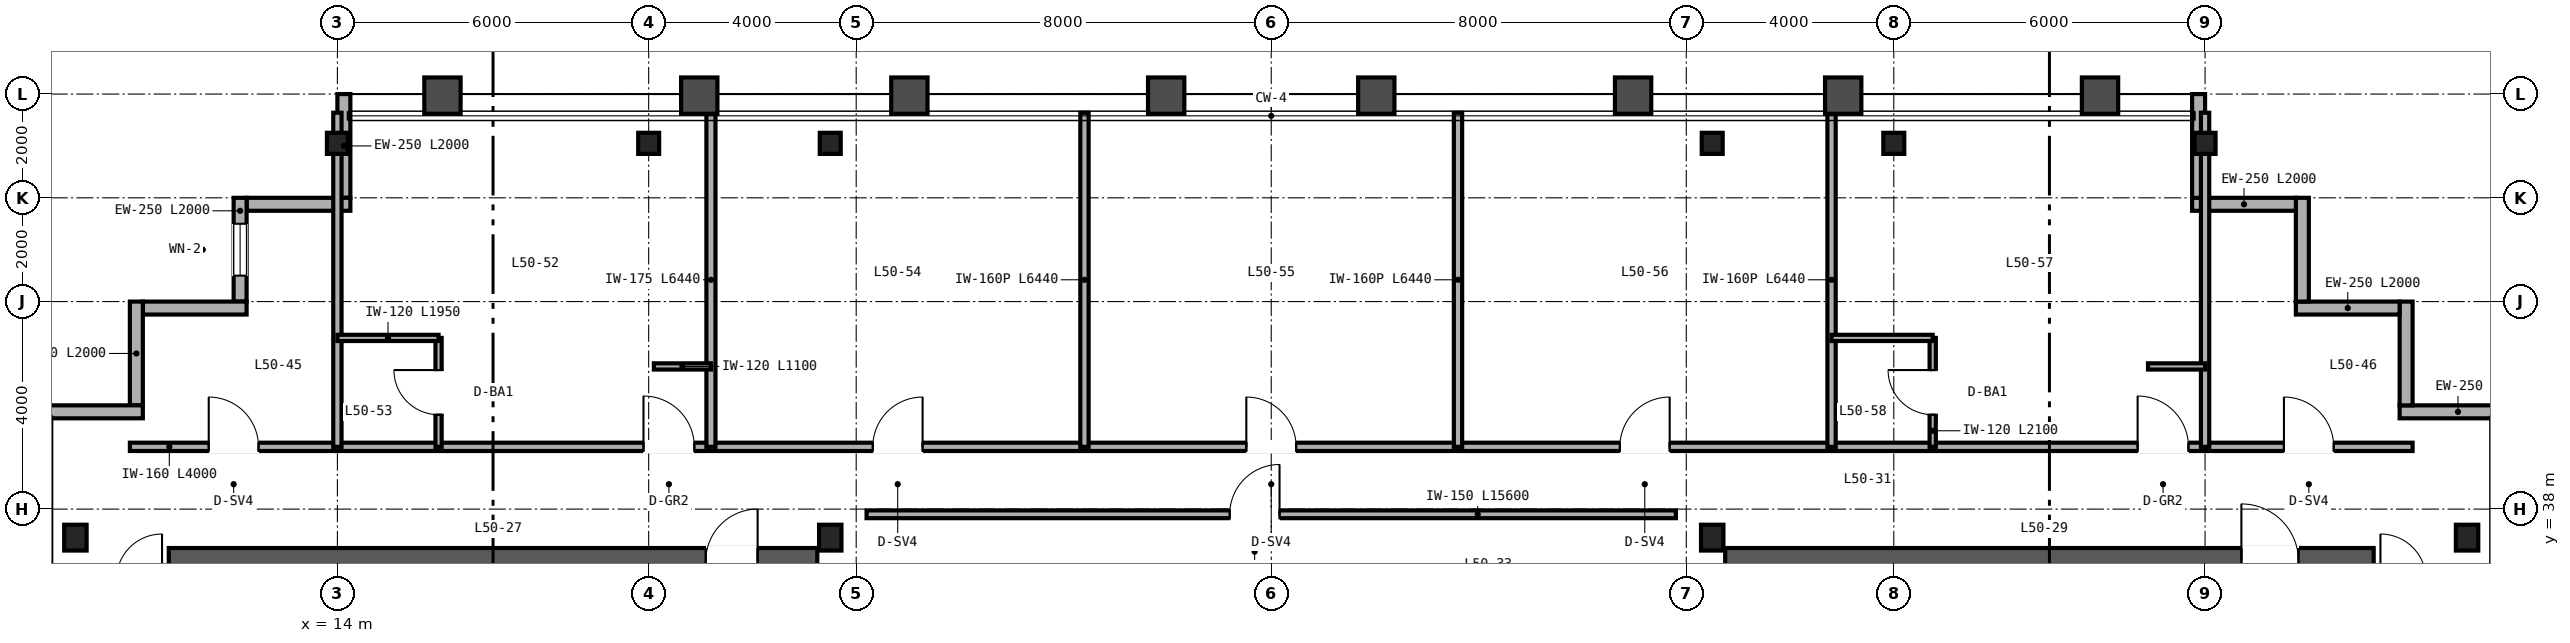
"""IFC4 building model, lengths in metres.
Left out: names, types, materials, properties, quantities, classifications, styles, units other than length and angle.
Written with IfcOpenShell. Run it as: python <this file> out.ifc"""

import sys

from ifc_helpers import new_model, si_unit, direction, frame, frame_2d, origin, origin_2d, place, context, subcontext, project, spatial, rectangle, i_section, extrude, source, transform, mapped, element, fill, save


model = new_model("IFC4")
c1 = context("Model", 3, precision=1e-05, world=origin(), true_north=direction((0.0, 1.0)))
c2 = subcontext(c1, "Body", "Model", "MODEL_VIEW")
j1 = project(units=[si_unit("LENGTHUNIT", "METRE"), si_unit("PLANEANGLEUNIT", "RADIAN")], contexts=[c1])
p1 = place(None, origin())
s1 = spatial("IfcSite", under=j1, at=p1, CompositionType="ELEMENT")
p2 = place(p1, origin())
s2 = spatial("IfcBuilding", under=s1, at=p2, CompositionType="ELEMENT")
p3 = place(p2, frame((0.0, 0.0, 199.2)))
s3 = spatial("IfcBuildingStorey", under=s2, at=p3, CompositionType="ELEMENT", Elevation=199.2)
p4 = place(p3, frame((10.75, 37.0, 0.0), z_axis=(0.0, 0.0, 1.0), x_axis=(1.0, 0.0, 0.0)))
e1 = element("IfcWall", 1, at=p4, inside=s3, PredefinedType="SHEAR", context=c2, shape_type="SweptSolid", body=[
    extrude(rectangle(XDim=12.5, YDim=0.5, at=frame_2d((6.25, 0.0))), origin(), (0.0, 0.0, 1.0), 3.37),
])
p5 = place(p4, frame((10.35, 0.0, 0.0)))
e2 = element("IfcOpeningElement", 2, at=p5, cuts=e1, PredefinedType="OPENING", context=c2, shape_type="SweptSolid", body=[
    extrude(rectangle(XDim=1.0, YDim=2.15, at=frame_2d((0.5, 1.075))), frame((0.0, 0.26, 0.0), z_axis=(0.0, -1.0, 0.0), x_axis=(1.0, 0.0, 0.0)), (0.0, 0.0, 1.0), 0.52),
])
p6 = place(p3, frame((40.75, 37.0, 0.0), z_axis=(0.0, 0.0, 1.0), x_axis=(1.0, 0.0, 0.0)))
e3 = element("IfcWall", 3, at=p6, inside=s3, PredefinedType="SHEAR", context=c2, shape_type="SweptSolid", body=[
    extrude(rectangle(XDim=12.5, YDim=0.5, at=frame_2d((6.25, 0.0))), origin(), (0.0, 0.0, 1.0), 3.37),
])
p7 = place(p6, frame((9.95, 0.0, 0.0)))
e4 = element("IfcOpeningElement", 4, at=p7, cuts=e3, PredefinedType="OPENING", context=c2, shape_type="SweptSolid", body=[
    extrude(rectangle(XDim=1.1, YDim=2.15, at=frame_2d((0.55, 1.075))), frame((0.0, 0.26, 0.0), z_axis=(0.0, -1.0, 0.0), x_axis=(1.0, 0.0, 0.0)), (0.0, 0.0, 1.0), 0.52),
])
m1 = source(origin(), c2, "Body", "SweptSolid", [
    extrude(i_section(OverallWidth=0.432, OverallDepth=0.498, WebThickness=0.056, FlangeThickness=0.089, FilletRadius=0.025, at=origin_2d()), origin(), (0.0, 0.0, 1.0), 3.37),
])
for number, where, z_axis, x_axis in (
    (5, (8.95, 37.45, 0.0), (0.0, 0.0, 1.0), (1.0, 0.0, 0.0)),
    (6, (23.5, 37.45, 0.0), (0.0, 0.0, 1.0), (1.0, 0.0, 0.0)),
    (7, (40.5, 37.45, 0.0), (0.0, 0.0, 1.0), (1.0, 0.0, 0.0)),
    (8, (55.05, 37.45, 0.0), (0.0, 0.0, 1.0), (1.0, 0.0, 0.0)),
):
    element("IfcColumn", number, at=place(p3, frame(where, z_axis=z_axis, x_axis=x_axis)), inside=s3, PredefinedType="COLUMN", context=c2, shape_type="MappedRepresentation", body=[
        mapped(m1, transform((0.0, 0.0, 0.0), scale=1.0)),
    ])
m2 = source(origin(), c2, "Body", "SweptSolid", [
    extrude(i_section(OverallWidth=0.404, OverallDepth=0.407, WebThickness=0.027, FlangeThickness=0.044, FilletRadius=0.025, at=origin_2d()), origin(), (0.0, 0.0, 1.0), 3.37),
])
for number, where, z_axis, x_axis in (
    (9, (14.0, 45.05, 0.0), (0.0, 0.0, 1.0), (1.0, 0.0, 0.0)),
    (10, (20.0, 45.05, 0.0), (0.0, 0.0, 1.0), (1.0, 0.0, 0.0)),
    (11, (23.5, 45.05, 0.0), (0.0, 0.0, 1.0), (1.0, 0.0, 0.0)),
    (12, (40.5, 45.05, 0.0), (0.0, 0.0, 1.0), (1.0, 0.0, 0.0)),
    (13, (44.0, 45.05, 0.0), (0.0, 0.0, 1.0), (1.0, 0.0, 0.0)),
    (14, (50.0, 45.05, 0.0), (0.0, 0.0, 1.0), (1.0, 0.0, 0.0)),
):
    element("IfcColumn", number, at=place(p3, frame(where, z_axis=z_axis, x_axis=x_axis)), inside=s3, PredefinedType="COLUMN", context=c2, shape_type="MappedRepresentation", body=[
        mapped(m2, transform((0.0, 0.0, 0.0), scale=1.0)),
    ])
p8 = place(p3, frame((56.0, 39.875, 0.0), z_axis=(0.0, 0.0, 1.0), x_axis=(-1.0, 0.0, 0.0)))
e15 = element("IfcWall", 15, at=p8, inside=s3, PredefinedType="SOLIDWALL", context=c2, shape_type="SweptSolid", body=[
    extrude(rectangle(XDim=2.25, YDim=0.25, at=frame_2d((1.125, 0.0))), origin(), (0.0, 0.0, 1.0), 3.37),
])
for number, where, z_axis, x_axis in (
    (16, (53.875, 40.0, 0.0), (0.0, 0.0, 1.0), (0.0, 1.0, 0.0)),
    (17, (53.75, 41.875, 0.0), (0.0, 0.0, 1.0), (-1.0, 0.0, 0.0)),
    (18, (51.875, 42.0, 0.0), (0.0, 0.0, 1.0), (0.0, 1.0, 0.0)),
    (19, (51.75, 43.875, 0.0), (0.0, 0.0, 1.0), (-1.0, 0.0, 0.0)),
):
    element("IfcWall", number, at=place(p3, frame(where, z_axis=z_axis, x_axis=x_axis)), inside=s3, PredefinedType="SOLIDWALL", context=c2, shape_type="SweptSolid", body=[
        extrude(rectangle(XDim=2.0, YDim=0.25, at=frame_2d((1.0, 0.0))), origin(), (0.0, 0.0, 1.0), 3.37),
    ])
for number, where, z_axis, x_axis in (
    (20, (49.875, 44.0, 0.0), (0.0, 0.0, 1.0), (0.0, 1.0, 0.0)),
    (21, (14.125, 46.0, 0.0), (0.0, 0.0, 1.0), (0.0, -1.0, 0.0)),
):
    element("IfcWall", number, at=place(p3, frame(where, z_axis=z_axis, x_axis=x_axis)), inside=s3, PredefinedType="SOLIDWALL", context=c2, shape_type="SweptSolid", body=[
        extrude(rectangle(XDim=2.0, YDim=0.25, at=frame_2d((1.0, 0.0))), origin(), (0.0, 0.0, 1.0), 2.677),
    ])
p9 = place(p3, frame((14.25, 43.875, 0.0), z_axis=(0.0, 0.0, 1.0), x_axis=(-1.0, 0.0, 0.0)))
e22 = element("IfcWall", 22, at=p9, inside=s3, PredefinedType="SOLIDWALL", context=c2, shape_type="SweptSolid", body=[
    extrude(rectangle(XDim=2.0, YDim=0.25, at=frame_2d((1.0, 0.0))), origin(), (0.0, 0.0, 1.0), 3.37),
])
p10 = place(p3, frame((12.125, 44.0, 0.0), z_axis=(0.0, 0.0, 1.0), x_axis=(0.0, -1.0, 0.0)))
e23 = element("IfcWall", 23, at=p10, inside=s3, PredefinedType="SOLIDWALL", context=c2, shape_type="SweptSolid", body=[
    extrude(rectangle(XDim=2.0, YDim=0.25, at=frame_2d((1.0, 0.0))), origin(), (0.0, 0.0, 1.0), 3.37),
])
p11 = place(p10, frame((0.5, 0.0, 0.85)))
e24 = element("IfcOpeningElement", 24, at=p11, cuts=e23, PredefinedType="OPENING", context=c2, shape_type="SweptSolid", body=[
    extrude(rectangle(XDim=1.0, YDim=1.9, at=frame_2d((0.5, 0.95))), frame((0.0, 0.135, 0.0), z_axis=(0.0, -1.0, 0.0), x_axis=(1.0, 0.0, 0.0)), (0.0, 0.0, 1.0), 0.27),
])
for number, where, z_axis, x_axis in (
    (25, (12.25, 41.875, 0.0), (0.0, 0.0, 1.0), (-1.0, 0.0, 0.0)),
    (26, (10.125, 42.0, 0.0), (0.0, 0.0, 1.0), (0.0, -1.0, 0.0)),
):
    element("IfcWall", number, at=place(p3, frame(where, z_axis=z_axis, x_axis=x_axis)), inside=s3, PredefinedType="SOLIDWALL", context=c2, shape_type="SweptSolid", body=[
        extrude(rectangle(XDim=2.0, YDim=0.25, at=frame_2d((1.0, 0.0))), origin(), (0.0, 0.0, 1.0), 3.37),
    ])
p12 = place(p3, frame((10.25, 39.875, 0.0), z_axis=(0.0, 0.0, 1.0), x_axis=(-1.0, 0.0, 0.0)))
e27 = element("IfcWall", 27, at=p12, inside=s3, PredefinedType="SOLIDWALL", context=c2, shape_type="SweptSolid", body=[
    extrude(rectangle(XDim=2.25, YDim=0.25, at=frame_2d((1.125, 0.0))), origin(), (0.0, 0.0, 1.0), 3.37),
])
p13 = place(p3, frame((24.2, 37.9, 0.0), z_axis=(0.0, 0.0, 1.0), x_axis=(1.0, 0.0, 0.0)))
e28 = element("IfcWall", 28, at=p13, inside=s3, PredefinedType="PARTITIONING", context=c2, shape_type="SweptSolid", body=[
    extrude(rectangle(XDim=15.6, YDim=0.15, at=frame_2d((7.8, 0.0))), origin(), (0.0, 0.0, 1.0), 3.37),
])
p14 = place(p13, frame((7.0, 0.0, 0.0)))
e29 = element("IfcOpeningElement", 29, at=p14, cuts=e28, PredefinedType="OPENING", context=c2, shape_type="SweptSolid", body=[
    extrude(rectangle(XDim=0.96, YDim=2.15, at=frame_2d((0.48, 1.075))), frame((0.0, 0.085, 0.0), z_axis=(0.0, -1.0, 0.0), x_axis=(1.0, 0.0, 0.0)), (0.0, 0.0, 1.0), 0.17),
])
p15 = place(p3, frame((10.0, 39.2, 0.0), z_axis=(0.0, 0.0, 1.0), x_axis=(1.0, 0.0, 0.0)))
e30 = element("IfcWall", 30, at=p15, inside=s3, PredefinedType="PARTITIONING", context=c2, shape_type="SweptSolid", body=[
    extrude(rectangle(XDim=4.0, YDim=0.16, at=frame_2d((2.0, 0.0))), origin(), (0.0, 0.0, 1.0), 3.37),
])
p16 = place(p15, frame((1.52, 0.0, 0.0)))
e31 = element("IfcOpeningElement", 31, at=p16, cuts=e30, PredefinedType="OPENING", context=c2, shape_type="SweptSolid", body=[
    extrude(rectangle(XDim=0.96, YDim=2.15, at=frame_2d((0.48, 1.075))), frame((0.0, 0.09, 0.0), z_axis=(0.0, -1.0, 0.0), x_axis=(1.0, 0.0, 0.0)), (0.0, 0.0, 1.0), 0.18),
])
p17 = place(p3, frame((50.0, 39.2, 0.0), z_axis=(0.0, 0.0, 1.0), x_axis=(1.0, 0.0, 0.0)))
e32 = element("IfcWall", 32, at=p17, inside=s3, PredefinedType="PARTITIONING", context=c2, shape_type="SweptSolid", body=[
    extrude(rectangle(XDim=4.0, YDim=0.16, at=frame_2d((2.0, 0.0))), origin(), (0.0, 0.0, 1.0), 3.37),
])
p18 = place(p17, frame((1.52, 0.0, 0.0)))
e33 = element("IfcOpeningElement", 33, at=p18, cuts=e32, PredefinedType="OPENING", context=c2, shape_type="SweptSolid", body=[
    extrude(rectangle(XDim=0.96, YDim=2.15, at=frame_2d((0.48, 1.075))), frame((0.0, 0.09, 0.0), z_axis=(0.0, -1.0, 0.0), x_axis=(1.0, 0.0, 0.0)), (0.0, 0.0, 1.0), 0.18),
])
p19 = place(p3, frame((14.0, 39.2, 0.0), z_axis=(0.0, 0.0, 1.0), x_axis=(1.0, 0.0, 0.0)))
e34 = element("IfcWall", 34, at=p19, inside=s3, PredefinedType="PARTITIONING", context=c2, shape_type="SweptSolid", body=[
    extrude(rectangle(XDim=36.0, YDim=0.16, at=frame_2d((18.0, 0.0))), origin(), (0.0, 0.0, 1.0), 2.913),
])
p20 = place(p19, frame((5.9, 0.0, 0.0)))
e35 = element("IfcOpeningElement", 35, at=p20, cuts=e34, PredefinedType="OPENING", context=c2, shape_type="SweptSolid", body=[
    extrude(rectangle(XDim=0.98, YDim=2.2, at=frame_2d((0.49, 1.1))), frame((0.0, 0.09, 0.0), z_axis=(0.0, -1.0, 0.0), x_axis=(1.0, 0.0, 0.0)), (0.0, 0.0, 1.0), 0.18),
])
p21 = place(p19, frame((10.32, 0.0, 0.0)))
e36 = element("IfcOpeningElement", 36, at=p21, cuts=e34, PredefinedType="OPENING", context=c2, shape_type="SweptSolid", body=[
    extrude(rectangle(XDim=0.96, YDim=2.15, at=frame_2d((0.48, 1.075))), frame((0.0, 0.09, 0.0), z_axis=(0.0, -1.0, 0.0), x_axis=(1.0, 0.0, 0.0)), (0.0, 0.0, 1.0), 0.18),
])
p22 = place(p19, frame((17.52, 0.0, 0.0)))
e37 = element("IfcOpeningElement", 37, at=p22, cuts=e34, PredefinedType="OPENING", context=c2, shape_type="SweptSolid", body=[
    extrude(rectangle(XDim=0.96, YDim=2.15, at=frame_2d((0.48, 1.075))), frame((0.0, 0.09, 0.0), z_axis=(0.0, -1.0, 0.0), x_axis=(1.0, 0.0, 0.0)), (0.0, 0.0, 1.0), 0.18),
])
p23 = place(p19, frame((24.72, 0.0, 0.0)))
e38 = element("IfcOpeningElement", 38, at=p23, cuts=e34, PredefinedType="OPENING", context=c2, shape_type="SweptSolid", body=[
    extrude(rectangle(XDim=0.96, YDim=2.15, at=frame_2d((0.48, 1.075))), frame((0.0, 0.09, 0.0), z_axis=(0.0, -1.0, 0.0), x_axis=(1.0, 0.0, 0.0)), (0.0, 0.0, 1.0), 0.18),
])
p24 = place(p19, frame((34.7, 0.0, 0.0)))
e39 = element("IfcOpeningElement", 39, at=p24, cuts=e34, PredefinedType="OPENING", context=c2, shape_type="SweptSolid", body=[
    extrude(rectangle(XDim=0.98, YDim=2.2, at=frame_2d((0.49, 1.1))), frame((0.0, 0.09, 0.0), z_axis=(0.0, -1.0, 0.0), x_axis=(1.0, 0.0, 0.0)), (0.0, 0.0, 1.0), 0.18),
])
for number, where, z_axis, x_axis in (
    (40, (14.0, 39.2, 0.0), (0.0, 0.0, 1.0), (0.0, 1.0, 0.0)),
    (41, (50.0, 39.2, 0.0), (0.0, 0.0, 1.0), (0.0, 1.0, 0.0)),
):
    element("IfcWall", number, at=place(p3, frame(where, z_axis=z_axis, x_axis=x_axis)), inside=s3, PredefinedType="PARTITIONING", context=c2, shape_type="SweptSolid", body=[
        extrude(rectangle(XDim=6.44, YDim=0.16, at=frame_2d((3.22, 0.0))), origin(), (0.0, 0.0, 1.0), 2.677),
    ])
p25 = place(p3, frame((21.2, 39.2, 0.0), z_axis=(0.0, 0.0, 1.0), x_axis=(0.0, 1.0, 0.0)))
e42 = element("IfcWall", 42, at=p25, inside=s3, PredefinedType="PARTITIONING", context=c2, shape_type="SweptSolid", body=[
    extrude(rectangle(XDim=6.44, YDim=0.175, at=frame_2d((3.22, 0.0))), origin(), (0.0, 0.0, 1.0), 2.833),
])
p26 = place(p3, frame((15.95, 39.2, 0.0), z_axis=(0.0, 0.0, 1.0), x_axis=(0.0, 1.0, 0.0)))
e43 = element("IfcWall", 43, at=p26, inside=s3, PredefinedType="PARTITIONING", context=c2, shape_type="SweptSolid", body=[
    extrude(rectangle(XDim=2.1, YDim=0.12, at=frame_2d((1.05, 0.0))), origin(), (0.0, 0.0, 1.0), 3.37),
])
p27 = place(p26, frame((0.62, 0.0, 0.0)))
e44 = element("IfcOpeningElement", 44, at=p27, cuts=e43, PredefinedType="OPENING", context=c2, shape_type="SweptSolid", body=[
    extrude(rectangle(XDim=0.86, YDim=2.1, at=frame_2d((0.43, 1.05))), frame((0.0, 0.07, 0.0), z_axis=(0.0, -1.0, 0.0), x_axis=(1.0, 0.0, 0.0)), (0.0, 0.0, 1.0), 0.14),
])
p28 = place(p3, frame((14.0, 41.3, 0.0), z_axis=(0.0, 0.0, 1.0), x_axis=(1.0, 0.0, 0.0)))
e45 = element("IfcWall", 45, at=p28, inside=s3, PredefinedType="PARTITIONING", context=c2, shape_type="SweptSolid", body=[
    extrude(rectangle(XDim=1.95, YDim=0.12, at=frame_2d((0.975, 0.0))), origin(), (0.0, 0.0, 1.0), 3.37),
])
p29 = place(p3, frame((20.1, 40.75, 0.0), z_axis=(0.0, 0.0, 1.0), x_axis=(1.0, 0.0, 0.0)))
e46 = element("IfcWall", 46, at=p29, inside=s3, PredefinedType="PARTITIONING", context=c2, shape_type="SweptSolid", body=[
    extrude(rectangle(XDim=1.1, YDim=0.12, at=frame_2d((0.55, 0.0))), origin(), (0.0, 0.0, 1.0), 3.37),
])
for number, where, z_axis, x_axis in (
    (47, (28.4, 39.2, 0.0), (0.0, 0.0, 1.0), (0.0, 1.0, 0.0)),
    (48, (35.6, 39.2, 0.0), (0.0, 0.0, 1.0), (0.0, 1.0, 0.0)),
):
    element("IfcWall", number, at=place(p3, frame(where, z_axis=z_axis, x_axis=x_axis)), inside=s3, PredefinedType="PARTITIONING", context=c2, shape_type="SweptSolid", body=[
        extrude(rectangle(XDim=6.44, YDim=0.16, at=frame_2d((3.22, 0.0))), origin(), (0.0, 0.0, 1.0), 2.443),
    ])
p30 = place(p3, frame((42.8, 39.2, 0.0), z_axis=(0.0, 0.0, 1.0), x_axis=(0.0, 1.0, 0.0)))
e49 = element("IfcWall", 49, at=p30, inside=s3, PredefinedType="PARTITIONING", context=c2, shape_type="SweptSolid", body=[
    extrude(rectangle(XDim=6.44, YDim=0.16, at=frame_2d((3.22, 0.0))), origin(), (0.0, 0.0, 1.0), 2.833),
])
p31 = place(p3, frame((44.75, 39.2, 0.0), z_axis=(0.0, 0.0, 1.0), x_axis=(0.0, 1.0, 0.0)))
e50 = element("IfcWall", 50, at=p31, inside=s3, PredefinedType="PARTITIONING", context=c2, shape_type="SweptSolid", body=[
    extrude(rectangle(XDim=2.1, YDim=0.12, at=frame_2d((1.05, 0.0))), origin(), (0.0, 0.0, 1.0), 3.37),
])
p32 = place(p31, frame((0.62, 0.0, 0.0)))
e51 = element("IfcOpeningElement", 51, at=p32, cuts=e50, PredefinedType="OPENING", context=c2, shape_type="SweptSolid", body=[
    extrude(rectangle(XDim=0.86, YDim=2.1, at=frame_2d((0.43, 1.05))), frame((0.0, 0.07, 0.0), z_axis=(0.0, -1.0, 0.0), x_axis=(1.0, 0.0, 0.0)), (0.0, 0.0, 1.0), 0.14),
])
p33 = place(p3, frame((42.8, 41.3, 0.0), z_axis=(0.0, 0.0, 1.0), x_axis=(1.0, 0.0, 0.0)))
e52 = element("IfcWall", 52, at=p33, inside=s3, PredefinedType="PARTITIONING", context=c2, shape_type="SweptSolid", body=[
    extrude(rectangle(XDim=1.95, YDim=0.12, at=frame_2d((0.975, 0.0))), origin(), (0.0, 0.0, 1.0), 3.37),
])
p34 = place(p3, frame((48.9, 40.75, 0.0), z_axis=(0.0, 0.0, 1.0), x_axis=(1.0, 0.0, 0.0)))
e53 = element("IfcWall", 53, at=p34, inside=s3, PredefinedType="PARTITIONING", context=c2, shape_type="SweptSolid", body=[
    extrude(rectangle(XDim=1.1, YDim=0.12, at=frame_2d((0.55, 0.0))), origin(), (0.0, 0.0, 1.0), 3.37),
])
m3 = source(origin(), c2, "Body", "SweptSolid", [
    extrude(rectangle(XDim=1.0, YDim=1.9, at=frame_2d((0.5, 0.95))), frame((0.0, 0.03, 0.0), z_axis=(0.0, -1.0, 0.0), x_axis=(1.0, 0.0, 0.0)), (0.0, 0.0, 1.0), 0.06),
])
p35 = place(p11, origin())
e54 = element("IfcWindow", 54, at=p35, inside=s3, PartitioningType="SINGLE_PANEL", PredefinedType="WINDOW", context=c2, shape_type="MappedRepresentation", body=[
    mapped(m3, transform((0.0, 0.0, 0.0), scale=1.0)),
])
fill(e24, e54)
m4 = source(origin(), c2, "Body", "SweptSolid", [
    extrude(rectangle(XDim=1.0, YDim=2.15, at=frame_2d((0.5, 1.075))), frame((0.0, 0.025, 0.0), z_axis=(0.0, -1.0, 0.0), x_axis=(1.0, 0.0, 0.0)), (0.0, 0.0, 1.0), 0.05),
])
p36 = place(p5, origin())
e55 = element("IfcDoor", 55, at=p36, inside=s3, OperationType="SINGLE_SWING_RIGHT", PredefinedType="DOOR", context=c2, shape_type="MappedRepresentation", body=[
    mapped(m4, transform((0.0, 0.0, 0.0), scale=1.0)),
])
fill(e2, e55)
m5 = source(origin(), c2, "Body", "SweptSolid", [
    extrude(rectangle(XDim=1.1, YDim=2.15, at=frame_2d((0.55, 1.075))), frame((0.0, 0.025, 0.0), z_axis=(0.0, -1.0, 0.0), x_axis=(1.0, 0.0, 0.0)), (0.0, 0.0, 1.0), 0.05),
])
p37 = place(p7, origin())
e56 = element("IfcDoor", 56, at=p37, inside=s3, OperationType="SINGLE_SWING_LEFT", PredefinedType="DOOR", context=c2, shape_type="MappedRepresentation", body=[
    mapped(m5, transform((0.0, 0.0, 0.0), scale=1.0)),
])
fill(e4, e56)
m6 = source(origin(), c2, "Body", "SweptSolid", [
    extrude(rectangle(XDim=0.96, YDim=2.15, at=frame_2d((0.48, 1.075))), frame((0.0, 0.025, 0.0), z_axis=(0.0, -1.0, 0.0), x_axis=(1.0, 0.0, 0.0)), (0.0, 0.0, 1.0), 0.05),
])
p38 = place(p14, origin())
e57 = element("IfcDoor", 57, at=p38, inside=s3, OperationType="SINGLE_SWING_RIGHT", PredefinedType="DOOR", context=c2, shape_type="MappedRepresentation", body=[
    mapped(m6, transform((0.0, 0.0, 0.0), scale=1.0)),
])
fill(e29, e57)
p39 = place(p16, origin())
e58 = element("IfcDoor", 58, at=p39, inside=s3, OperationType="SINGLE_SWING_LEFT", PredefinedType="DOOR", context=c2, shape_type="MappedRepresentation", body=[
    mapped(m6, transform((0.0, 0.0, 0.0), scale=1.0)),
])
fill(e31, e58)
p40 = place(p18, origin())
e59 = element("IfcDoor", 59, at=p40, inside=s3, OperationType="SINGLE_SWING_LEFT", PredefinedType="DOOR", context=c2, shape_type="MappedRepresentation", body=[
    mapped(m6, transform((0.0, 0.0, 0.0), scale=1.0)),
])
fill(e33, e59)
m7 = source(origin(), c2, "Body", "SweptSolid", [
    extrude(rectangle(XDim=0.86, YDim=2.1, at=frame_2d((0.43, 1.05))), frame((0.0, 0.025, 0.0), z_axis=(0.0, -1.0, 0.0), x_axis=(1.0, 0.0, 0.0)), (0.0, 0.0, 1.0), 0.05),
])
p41 = place(p27, origin())
e60 = element("IfcDoor", 60, at=p41, inside=s3, OperationType="SINGLE_SWING_RIGHT", PredefinedType="DOOR", context=c2, shape_type="MappedRepresentation", body=[
    mapped(m7, transform((0.0, 0.0, 0.0), scale=1.0)),
])
fill(e44, e60)
p42 = place(p32, origin())
e61 = element("IfcDoor", 61, at=p42, inside=s3, OperationType="SINGLE_SWING_RIGHT", PredefinedType="DOOR", context=c2, shape_type="MappedRepresentation", body=[
    mapped(m7, transform((0.0, 0.0, 0.0), scale=1.0)),
])
fill(e51, e61)
m8 = source(origin(), c2, "Body", "SweptSolid", [
    extrude(rectangle(XDim=0.98, YDim=2.2, at=frame_2d((0.49, 1.1))), frame((0.0, 0.025, 0.0), z_axis=(0.0, -1.0, 0.0), x_axis=(1.0, 0.0, 0.0)), (0.0, 0.0, 1.0), 0.05),
])
p43 = place(p20, origin())
e62 = element("IfcDoor", 62, at=p43, inside=s3, OperationType="SINGLE_SWING_LEFT", PredefinedType="DOOR", context=c2, shape_type="MappedRepresentation", body=[
    mapped(m8, transform((0.0, 0.0, 0.0), scale=1.0)),
])
fill(e35, e62)
p44 = place(p21, origin())
e63 = element("IfcDoor", 63, at=p44, inside=s3, OperationType="SINGLE_SWING_RIGHT", PredefinedType="DOOR", context=c2, shape_type="MappedRepresentation", body=[
    mapped(m6, transform((0.0, 0.0, 0.0), scale=1.0)),
])
fill(e36, e63)
p45 = place(p22, origin())
e64 = element("IfcDoor", 64, at=p45, inside=s3, OperationType="SINGLE_SWING_LEFT", PredefinedType="DOOR", context=c2, shape_type="MappedRepresentation", body=[
    mapped(m6, transform((0.0, 0.0, 0.0), scale=1.0)),
])
fill(e37, e64)
p46 = place(p23, origin())
e65 = element("IfcDoor", 65, at=p46, inside=s3, OperationType="SINGLE_SWING_RIGHT", PredefinedType="DOOR", context=c2, shape_type="MappedRepresentation", body=[
    mapped(m6, transform((0.0, 0.0, 0.0), scale=1.0)),
])
fill(e38, e65)
p47 = place(p24, origin())
e66 = element("IfcDoor", 66, at=p47, inside=s3, OperationType="SINGLE_SWING_LEFT", PredefinedType="DOOR", context=c2, shape_type="MappedRepresentation", body=[
    mapped(m8, transform((0.0, 0.0, 0.0), scale=1.0)),
])
fill(e39, e66)
save(model, sys.argv[1])
